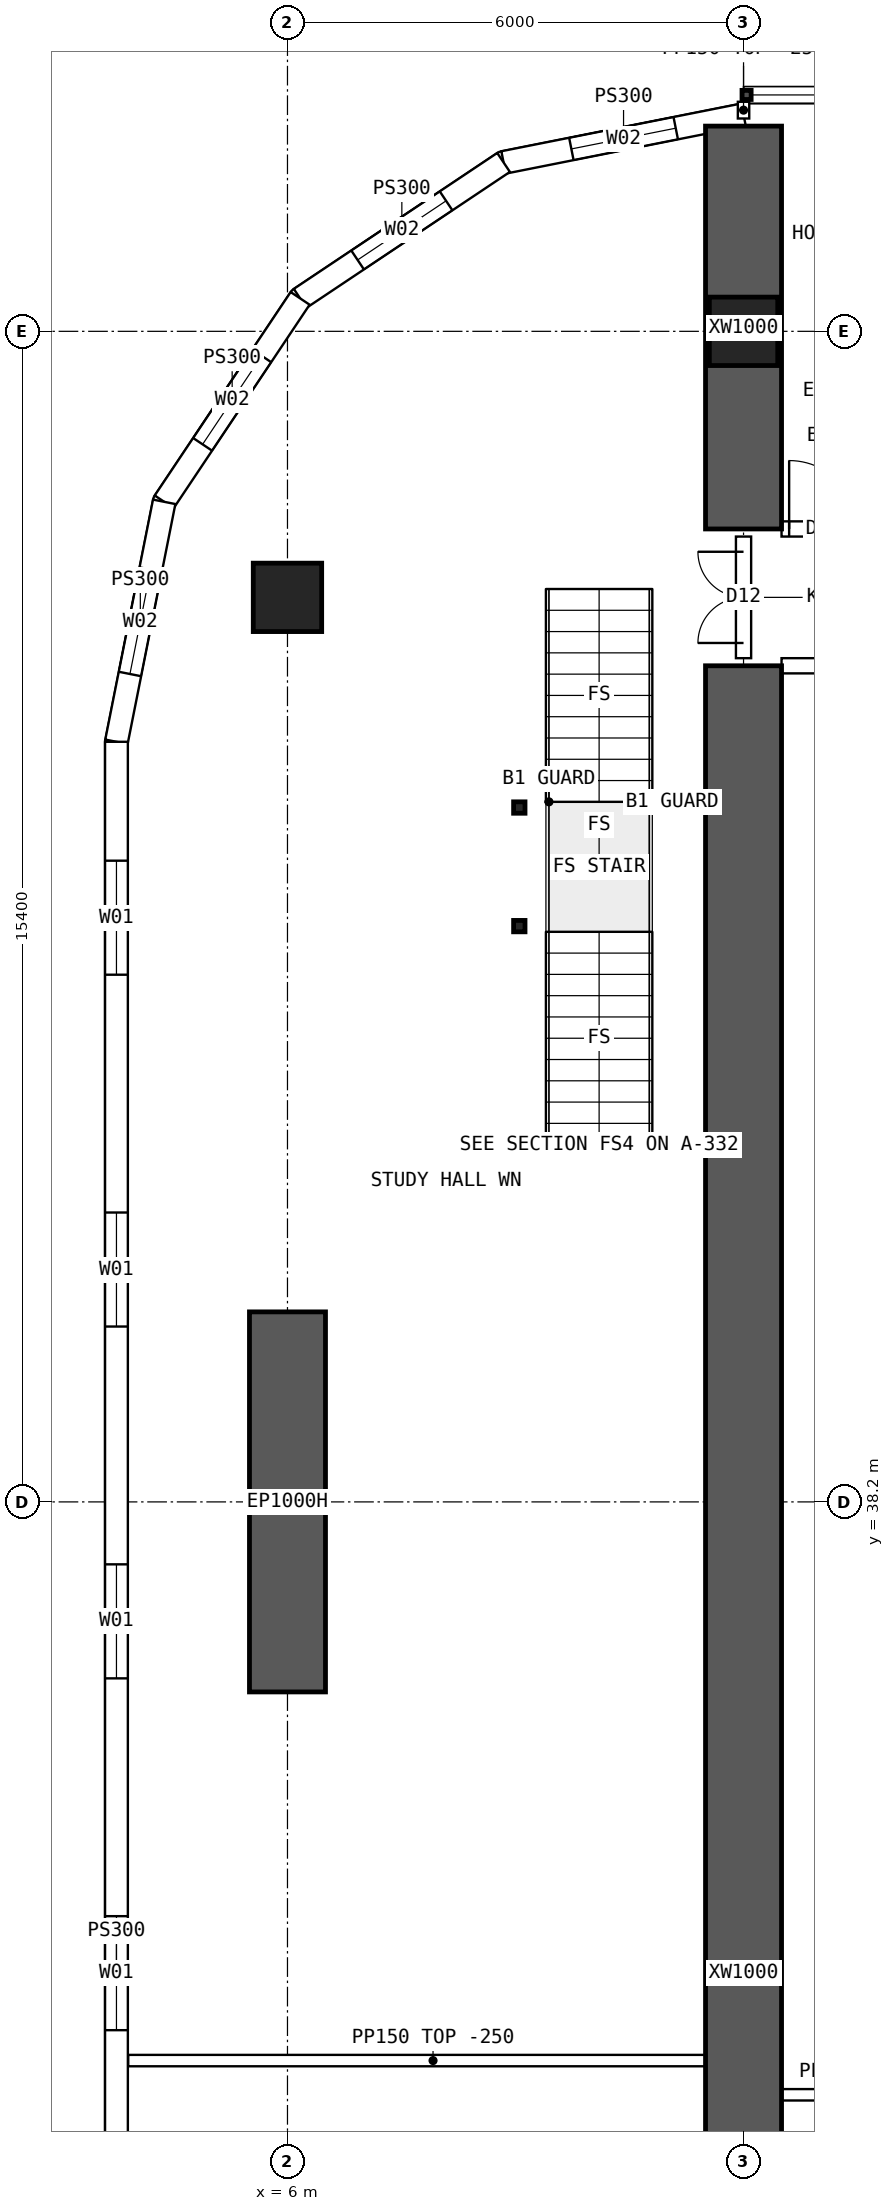
"""IFC4 building model, lengths in metres.
Left out: names, types, materials, properties, quantities, classifications, styles, units other than length and angle.
Written with IfcOpenShell. Run it as: python <this file> out.ifc"""

import sys

from ifc_helpers import new_model, si_unit, direction, frame, frame_2d, origin, origin_2d, place, context, subcontext, project, spatial, polyline, rectangle, hollow_rectangle, outline, extrude, element, fill, save


model = new_model("IFC4")
c1 = context("Model", 3, precision=1e-05, world=origin(), true_north=direction((0.0, 1.0)))
c2 = subcontext(c1, "Body", "Model", "MODEL_VIEW")
j1 = project(units=[si_unit("LENGTHUNIT", "METRE"), si_unit("PLANEANGLEUNIT", "RADIAN")], contexts=[c1])
p1 = place(None, origin())
s1 = spatial("IfcSite", under=j1, at=p1, CompositionType="ELEMENT")
p2 = place(p1, origin())
s2 = spatial("IfcBuilding", under=s1, at=p2, CompositionType="ELEMENT")
p3 = place(p2, frame((0.0, 0.0, 38.95)))
s3 = spatial("IfcBuildingStorey", under=s2, at=p3, CompositionType="ELEMENT", Elevation=38.95)
for number, where, z_axis, x_axis in (
    (1, (12.0, 53.6, 0.0), (0.0, 0.0, 1.0), (1.0, 0.0, 0.0)),
    (2, (6.0, 50.1, 0.0), (0.0, 0.0, 1.0), (1.0, 0.0, 0.0)),
):
    element("IfcColumn", number, at=place(p3, frame(where, z_axis=z_axis, x_axis=x_axis)), inside=s3, PredefinedType="COLUMN", context=c2, shape_type="SweptSolid", body=[
        extrude(hollow_rectangle(XDim=0.9, YDim=0.9, WallThickness=0.09, at=origin_2d()), origin(), (0.0, 0.0, 1.0), 3.75),
    ])
p4 = place(p3, frame((6.0, 35.7, 0.0), z_axis=(0.0, 0.0, 1.0), x_axis=(0.0, 1.0, 0.0)))
e3 = element("IfcWall", 3, at=p4, inside=s3, PredefinedType="SHEAR", context=c2, shape_type="SweptSolid", body=[
    extrude(rectangle(XDim=5.0, YDim=1.0, at=frame_2d((2.5, 0.0))), origin(), (0.0, 0.0, 1.0), 3.75),
])
p5 = place(p3, frame((12.0, 51.0, 0.0), z_axis=(0.0, 0.0, 1.0), x_axis=(0.0, 1.0, 0.0)))
e4 = element("IfcWall", 4, at=p5, inside=s3, PredefinedType="SHEAR", context=c2, shape_type="SweptSolid", body=[
    extrude(rectangle(XDim=5.3, YDim=1.0, at=frame_2d((2.65, 0.0))), origin(), (0.0, 0.0, 1.0), 3.75),
])
p6 = place(p3, frame((12.0, 14.8, 0.0), z_axis=(0.0, 0.0, 1.0), x_axis=(0.0, 1.0, 0.0)))
e5 = element("IfcWall", 5, at=p6, inside=s3, PredefinedType="SHEAR", context=c2, shape_type="SweptSolid", body=[
    extrude(rectangle(XDim=34.4, YDim=1.0, at=frame_2d((17.2, 0.0))), origin(), (0.0, 0.0, 1.0), 3.75),
])
p7 = place(p3, frame((3.75, 48.2, 0.0), z_axis=(0.0, 0.0, 1.0), x_axis=(0.0, -1.0, 0.0)))
e6 = element("IfcWall", 6, at=p7, inside=s3, PredefinedType="SOLIDWALL", context=c2, shape_type="SweptSolid", body=[
    extrude(outline(polyline([(-0.015, -0.15), (32.415, -0.15), (32.385, 0.15), (0.015, 0.15), (-0.015, -0.15)])), origin(), (0.0, 0.0, 1.0), 3.5),
])
p8 = place(p7, frame((1.564, 0.0, 0.9)))
e7 = element("IfcOpeningElement", 7, at=p8, cuts=e6, PredefinedType="OPENING", context=c2, shape_type="SweptSolid", body=[
    extrude(rectangle(XDim=1.5, YDim=2.0, at=frame_2d((0.75, 1.0))), frame((0.0, 0.16, 0.0), z_axis=(0.0, -1.0, 0.0), x_axis=(1.0, 0.0, 0.0)), (0.0, 0.0, 1.0), 0.32),
])
p9 = place(p7, frame((6.193, 0.0, 0.9)))
e8 = element("IfcOpeningElement", 8, at=p9, cuts=e6, PredefinedType="OPENING", context=c2, shape_type="SweptSolid", body=[
    extrude(rectangle(XDim=1.5, YDim=2.0, at=frame_2d((0.75, 1.0))), frame((0.0, 0.16, 0.0), z_axis=(0.0, -1.0, 0.0), x_axis=(1.0, 0.0, 0.0)), (0.0, 0.0, 1.0), 0.32),
])
p10 = place(p7, frame((10.822, 0.0, 0.9)))
e9 = element("IfcOpeningElement", 9, at=p10, cuts=e6, PredefinedType="OPENING", context=c2, shape_type="SweptSolid", body=[
    extrude(rectangle(XDim=1.5, YDim=2.0, at=frame_2d((0.75, 1.0))), frame((0.0, 0.16, 0.0), z_axis=(0.0, -1.0, 0.0), x_axis=(1.0, 0.0, 0.0)), (0.0, 0.0, 1.0), 0.32),
])
p11 = place(p7, frame((15.45, 0.0, 0.9)))
e10 = element("IfcOpeningElement", 10, at=p11, cuts=e6, PredefinedType="OPENING", context=c2, shape_type="SweptSolid", body=[
    extrude(rectangle(XDim=1.5, YDim=2.0, at=frame_2d((0.75, 1.0))), frame((0.0, 0.16, 0.0), z_axis=(0.0, -1.0, 0.0), x_axis=(1.0, 0.0, 0.0)), (0.0, 0.0, 1.0), 0.32),
])
p12 = place(p7, frame((20.079, 0.0, 0.9)))
e11 = element("IfcOpeningElement", 11, at=p12, cuts=e6, PredefinedType="OPENING", context=c2, shape_type="SweptSolid", body=[
    extrude(rectangle(XDim=1.5, YDim=2.0, at=frame_2d((0.75, 1.0))), frame((0.0, 0.16, 0.0), z_axis=(0.0, -1.0, 0.0), x_axis=(1.0, 0.0, 0.0)), (0.0, 0.0, 1.0), 0.32),
])
p13 = place(p7, frame((24.707, 0.0, 0.9)))
e12 = element("IfcOpeningElement", 12, at=p13, cuts=e6, PredefinedType="OPENING", context=c2, shape_type="SweptSolid", body=[
    extrude(rectangle(XDim=1.5, YDim=2.0, at=frame_2d((0.75, 1.0))), frame((0.0, 0.16, 0.0), z_axis=(0.0, -1.0, 0.0), x_axis=(1.0, 0.0, 0.0)), (0.0, 0.0, 1.0), 0.32),
])
p14 = place(p7, frame((29.336, 0.0, 0.9)))
e13 = element("IfcOpeningElement", 13, at=p14, cuts=e6, PredefinedType="OPENING", context=c2, shape_type="SweptSolid", body=[
    extrude(rectangle(XDim=1.5, YDim=2.0, at=frame_2d((0.75, 1.0))), frame((0.0, 0.16, 0.0), z_axis=(0.0, -1.0, 0.0), x_axis=(1.0, 0.0, 0.0)), (0.0, 0.0, 1.0), 0.32),
])
p15 = place(p3, frame((12.0, 56.45, 0.0), z_axis=(0.0, 0.0, 1.0), x_axis=(-0.980787251524, -0.195080412259, 0.0)))
e14 = element("IfcWall", 14, at=p15, inside=s3, PredefinedType="SOLIDWALL", context=c2, shape_type="SweptSolid", body=[
    extrude(outline(polyline([(-0.03, -0.15), (3.249, -0.15), (3.189, 0.15), (0.03, 0.15), (-0.03, -0.15)])), origin(), (0.0, 0.0, 1.0), 3.5),
])
p16 = place(p15, frame((0.909, 0.0, 0.9)))
e15 = element("IfcOpeningElement", 15, at=p16, cuts=e14, PredefinedType="OPENING", context=c2, shape_type="SweptSolid", body=[
    extrude(rectangle(XDim=1.4, YDim=1.8, at=frame_2d((0.7, 0.9))), frame((0.0, 0.16, 0.0), z_axis=(0.0, -1.0, 0.0), x_axis=(1.0, 0.0, 0.0)), (0.0, 0.0, 1.0), 0.32),
])
p17 = place(p3, frame((8.843, 55.822, 0.0), z_axis=(0.0, 0.0, 1.0), x_axis=(-0.831478105043, -0.555557522525, 0.0)))
e16 = element("IfcWall", 16, at=p17, inside=s3, PredefinedType="SOLIDWALL", context=c2, shape_type="SweptSolid", body=[
    extrude(outline(polyline([(-0.03, -0.15), (3.249, -0.15), (3.189, 0.15), (0.03, 0.15), (-0.03, -0.15)])), origin(), (0.0, 0.0, 1.0), 3.5),
])
p18 = place(p17, frame((0.909, 0.0, 0.9)))
e17 = element("IfcOpeningElement", 17, at=p18, cuts=e16, PredefinedType="OPENING", context=c2, shape_type="SweptSolid", body=[
    extrude(rectangle(XDim=1.4, YDim=1.8, at=frame_2d((0.7, 0.9))), frame((0.0, 0.16, 0.0), z_axis=(0.0, -1.0, 0.0), x_axis=(1.0, 0.0, 0.0)), (0.0, 0.0, 1.0), 0.32),
])
p19 = place(p3, frame((6.167, 54.034, 0.0), z_axis=(0.0, 0.0, 1.0), x_axis=(-0.555609954424, -0.831443069936, 0.0)))
e18 = element("IfcWall", 18, at=p19, inside=s3, PredefinedType="SOLIDWALL", context=c2, shape_type="SweptSolid", body=[
    extrude(outline(polyline([(-0.03, -0.15), (3.249, -0.15), (3.189, 0.15), (0.03, 0.15), (-0.03, -0.15)])), origin(), (0.0, 0.0, 1.0), 3.5),
])
p20 = place(p19, frame((0.909, 0.0, 0.9)))
e19 = element("IfcOpeningElement", 19, at=p20, cuts=e18, PredefinedType="OPENING", context=c2, shape_type="SweptSolid", body=[
    extrude(rectangle(XDim=1.4, YDim=1.8, at=frame_2d((0.7, 0.9))), frame((0.0, 0.16, 0.0), z_axis=(0.0, -1.0, 0.0), x_axis=(1.0, 0.0, 0.0)), (0.0, 0.0, 1.0), 0.32),
])
p21 = place(p3, frame((4.378, 51.357, 0.0), z_axis=(0.0, 0.0, 1.0), x_axis=(-0.195065901187, -0.980790137692, 0.0)))
e20 = element("IfcWall", 20, at=p21, inside=s3, PredefinedType="SOLIDWALL", context=c2, shape_type="SweptSolid", body=[
    extrude(outline(polyline([(-0.03, -0.15), (3.234, -0.15), (3.204, 0.15), (0.03, 0.15), (-0.03, -0.15)])), origin(), (0.0, 0.0, 1.0), 3.5),
])
p22 = place(p21, frame((0.909, 0.0, 0.9)))
e21 = element("IfcOpeningElement", 21, at=p22, cuts=e20, PredefinedType="OPENING", context=c2, shape_type="SweptSolid", body=[
    extrude(rectangle(XDim=1.4, YDim=1.8, at=frame_2d((0.7, 0.9))), frame((0.0, 0.16, 0.0), z_axis=(0.0, -1.0, 0.0), x_axis=(1.0, 0.0, 0.0)), (0.0, 0.0, 1.0), 0.32),
])
p23 = place(p3, frame((12.5, 51.0, 0.0), z_axis=(0.0, 0.0, 1.0), x_axis=(1.0, 0.0, 0.0)))
e22 = element("IfcWall", 22, at=p23, inside=s3, PredefinedType="SOLIDWALL", context=c2, shape_type="SweptSolid", body=[
    extrude(outline(polyline([(0.0, 0.0), (5.0, 0.0), (5.0, 3.1), (0.0, 3.1), (0.0, 0.0)])), frame((0.0, 0.1, 0.0), z_axis=(0.0, -1.0, 0.0), x_axis=(1.0, 0.0, 0.0)), (0.0, 0.0, 1.0), 0.2),
])
p24 = place(p23, frame((0.1, 0.0, 0.0)))
e23 = element("IfcOpeningElement", 23, at=p24, cuts=e22, PredefinedType="OPENING", context=c2, shape_type="SweptSolid", body=[
    extrude(rectangle(XDim=0.9, YDim=2.1, at=frame_2d((0.45, 1.05))), frame((0.0, 0.11, 0.0), z_axis=(0.0, -1.0, 0.0), x_axis=(1.0, 0.0, 0.0)), (0.0, 0.0, 1.0), 0.22),
])
p25 = place(p23, frame((4.0, 0.0, 0.0)))
e24 = element("IfcOpeningElement", 24, at=p25, cuts=e22, PredefinedType="OPENING", context=c2, shape_type="SweptSolid", body=[
    extrude(rectangle(XDim=0.9, YDim=2.1, at=frame_2d((0.45, 1.05))), frame((0.0, 0.11, 0.0), z_axis=(0.0, -1.0, 0.0), x_axis=(1.0, 0.0, 0.0)), (0.0, 0.0, 1.0), 0.22),
])
p26 = place(p3, frame((12.5, 49.2, 0.0), z_axis=(0.0, 0.0, 1.0), x_axis=(1.0, 0.0, 0.0)))
e25 = element("IfcWall", 25, at=p26, inside=s3, PredefinedType="SOLIDWALL", context=c2, shape_type="SweptSolid", body=[
    extrude(rectangle(XDim=5.0, YDim=0.2, at=frame_2d((2.5, 0.0))), origin(), (0.0, 0.0, 1.0), 3.5),
])
p27 = place(p26, frame((3.3, 0.0, 0.0)))
e26 = element("IfcOpeningElement", 26, at=p27, cuts=e25, PredefinedType="OPENING", context=c2, shape_type="SweptSolid", body=[
    extrude(rectangle(XDim=1.6, YDim=2.1, at=frame_2d((0.8, 1.05))), frame((0.0, 0.11, 0.0), z_axis=(0.0, -1.0, 0.0), x_axis=(1.0, 0.0, 0.0)), (0.0, 0.0, 1.0), 0.22),
])
p28 = place(p3, frame((12.0, 30.4, 0.0), z_axis=(0.0, 0.0, 1.0), x_axis=(1.0, 0.0, 0.0)))
e27 = element("IfcWall", 27, at=p28, inside=s3, PredefinedType="PARTITIONING", context=c2, shape_type="SweptSolid", body=[
    extrude(rectangle(XDim=3.6, YDim=0.15, at=frame_2d((1.8, 0.0))), origin(), (0.0, 0.0, 1.0), 3.5),
])
p29 = place(p3, frame((3.905, 30.85, 0.0), z_axis=(0.0, 0.0, 1.0), x_axis=(1.0, 0.0, 0.0)))
e28 = element("IfcWall", 28, at=p29, inside=s3, PredefinedType="PARTITIONING", context=c2, shape_type="SweptSolid", body=[
    extrude(outline(polyline([(0.0, 0.0), (8.02, 0.0), (8.02, 3.5), (2.397, 3.5), (2.395, 3.05), (1.797, 3.05), (1.795, 3.5), (0.0, 3.5), (0.0, 0.0)])), frame((0.0, 0.075, 0.0), z_axis=(0.0, -1.0, 0.0), x_axis=(1.0, 0.0, 0.0)), (0.0, 0.0, 1.0), 0.15),
])
p30 = place(p3, frame((12.0, 49.3, 0.0), z_axis=(0.0, 0.0, 1.0), x_axis=(0.0, 1.0, 0.0)))
e29 = element("IfcWall", 29, at=p30, inside=s3, PredefinedType="SOLIDWALL", context=c2, shape_type="SweptSolid", body=[
    extrude(outline(polyline([(0.0, 0.0), (1.6, 0.0), (1.6, 3.05), (0.0, 3.05), (0.0, 0.0)])), frame((0.0, 0.1, 0.0), z_axis=(0.0, -1.0, 0.0), x_axis=(1.0, 0.0, 0.0)), (0.0, 0.0, 1.0), 0.2),
])
p31 = place(p30, frame((0.2, 0.0, 0.0)))
e30 = element("IfcOpeningElement", 30, at=p31, cuts=e29, PredefinedType="OPENING", context=c2, shape_type="SweptSolid", body=[
    extrude(rectangle(XDim=1.2, YDim=2.1, at=frame_2d((0.6, 1.05))), frame((0.0, 0.11, 0.0), z_axis=(0.0, -1.0, 0.0), x_axis=(1.0, 0.0, 0.0)), (0.0, 0.0, 1.0), 0.22),
])
p32 = place(p3, frame((12.0, 56.4, 0.0), z_axis=(0.0, 0.0, 1.0), x_axis=(0.0, 1.0, 0.0)))
e31 = element("IfcWall", 31, at=p32, inside=s3, PredefinedType="PARTITIONING", context=c2, shape_type="SweptSolid", body=[
    extrude(rectangle(XDim=0.22, YDim=0.15, at=frame_2d((0.11, 0.0))), origin(), (0.0, 0.0, 1.0), 3.5),
])
for number, where, z_axis, x_axis in (
    (32, (9.05, 45.775, 0.0), (0.0, 0.0, 1.0), (1.0, 0.0, 0.0)),
    (33, (9.05, 47.335, 0.0), (0.0, 0.0, 1.0), (1.0, 0.0, 0.0)),
):
    element("IfcColumn", number, at=place(p3, frame(where, z_axis=z_axis, x_axis=x_axis)), inside=s3, PredefinedType="COLUMN", context=c2, shape_type="SweptSolid", body=[
        extrude(hollow_rectangle(XDim=0.15, YDim=0.15, WallThickness=0.008, at=origin_2d()), origin(), (0.0, 0.0, 1.0), 3.5),
    ])
p33 = place(p8, origin())
e34 = element("IfcWindow", 34, at=p33, inside=s3, PartitioningType="SINGLE_PANEL", PredefinedType="WINDOW", context=c2, shape_type="SweptSolid", body=[
    extrude(rectangle(XDim=1.5, YDim=2.0, at=frame_2d((0.75, 1.0))), frame((0.0, 0.03, 0.0), z_axis=(0.0, -1.0, 0.0), x_axis=(1.0, 0.0, 0.0)), (0.0, 0.0, 1.0), 0.06),
])
fill(e7, e34)
p34 = place(p9, origin())
e35 = element("IfcWindow", 35, at=p34, inside=s3, PartitioningType="SINGLE_PANEL", PredefinedType="WINDOW", context=c2, shape_type="SweptSolid", body=[
    extrude(rectangle(XDim=1.5, YDim=2.0, at=frame_2d((0.75, 1.0))), frame((0.0, 0.03, 0.0), z_axis=(0.0, -1.0, 0.0), x_axis=(1.0, 0.0, 0.0)), (0.0, 0.0, 1.0), 0.06),
])
fill(e8, e35)
p35 = place(p10, origin())
e36 = element("IfcWindow", 36, at=p35, inside=s3, PartitioningType="SINGLE_PANEL", PredefinedType="WINDOW", context=c2, shape_type="SweptSolid", body=[
    extrude(rectangle(XDim=1.5, YDim=2.0, at=frame_2d((0.75, 1.0))), frame((0.0, 0.03, 0.0), z_axis=(0.0, -1.0, 0.0), x_axis=(1.0, 0.0, 0.0)), (0.0, 0.0, 1.0), 0.06),
])
fill(e9, e36)
p36 = place(p11, origin())
e37 = element("IfcWindow", 37, at=p36, inside=s3, PartitioningType="SINGLE_PANEL", PredefinedType="WINDOW", context=c2, shape_type="SweptSolid", body=[
    extrude(rectangle(XDim=1.5, YDim=2.0, at=frame_2d((0.75, 1.0))), frame((0.0, 0.03, 0.0), z_axis=(0.0, -1.0, 0.0), x_axis=(1.0, 0.0, 0.0)), (0.0, 0.0, 1.0), 0.06),
])
fill(e10, e37)
p37 = place(p16, origin())
e38 = element("IfcWindow", 38, at=p37, inside=s3, PartitioningType="SINGLE_PANEL", PredefinedType="WINDOW", context=c2, shape_type="SweptSolid", body=[
    extrude(rectangle(XDim=1.4, YDim=1.8, at=frame_2d((0.7, 0.9))), frame((0.0, 0.03, 0.0), z_axis=(0.0, -1.0, 0.0), x_axis=(1.0, 0.0, 0.0)), (0.0, 0.0, 1.0), 0.06),
])
fill(e15, e38)
p38 = place(p18, origin())
e39 = element("IfcWindow", 39, at=p38, inside=s3, PartitioningType="SINGLE_PANEL", PredefinedType="WINDOW", context=c2, shape_type="SweptSolid", body=[
    extrude(rectangle(XDim=1.4, YDim=1.8, at=frame_2d((0.7, 0.9))), frame((0.0, 0.03, 0.0), z_axis=(0.0, -1.0, 0.0), x_axis=(1.0, 0.0, 0.0)), (0.0, 0.0, 1.0), 0.06),
])
fill(e17, e39)
p39 = place(p20, origin())
e40 = element("IfcWindow", 40, at=p39, inside=s3, PartitioningType="SINGLE_PANEL", PredefinedType="WINDOW", context=c2, shape_type="SweptSolid", body=[
    extrude(rectangle(XDim=1.4, YDim=1.8, at=frame_2d((0.7, 0.9))), frame((0.0, 0.03, 0.0), z_axis=(0.0, -1.0, 0.0), x_axis=(1.0, 0.0, 0.0)), (0.0, 0.0, 1.0), 0.06),
])
fill(e19, e40)
p40 = place(p22, origin())
e41 = element("IfcWindow", 41, at=p40, inside=s3, PartitioningType="SINGLE_PANEL", PredefinedType="WINDOW", context=c2, shape_type="SweptSolid", body=[
    extrude(rectangle(XDim=1.4, YDim=1.8, at=frame_2d((0.7, 0.9))), frame((0.0, 0.03, 0.0), z_axis=(0.0, -1.0, 0.0), x_axis=(1.0, 0.0, 0.0)), (0.0, 0.0, 1.0), 0.06),
])
fill(e21, e41)
p41 = place(p24, origin())
e42 = element("IfcDoor", 42, at=p41, inside=s3, OperationType="SINGLE_SWING_LEFT", PredefinedType="DOOR", context=c2, shape_type="SweptSolid", body=[
    extrude(rectangle(XDim=0.9, YDim=2.1, at=frame_2d((0.45, 1.05))), frame((0.0, 0.025, 0.0), z_axis=(0.0, -1.0, 0.0), x_axis=(1.0, 0.0, 0.0)), (0.0, 0.0, 1.0), 0.05),
])
fill(e23, e42)
p42 = place(p31, origin())
e43 = element("IfcDoor", 43, at=p42, inside=s3, OperationType="DOUBLE_DOOR_SINGLE_SWING", PredefinedType="DOOR", context=c2, shape_type="SweptSolid", body=[
    extrude(rectangle(XDim=1.2, YDim=2.1, at=frame_2d((0.6, 1.05))), frame((0.0, 0.025, 0.0), z_axis=(0.0, -1.0, 0.0), x_axis=(1.0, 0.0, 0.0)), (0.0, 0.0, 1.0), 0.05),
])
fill(e30, e43)
save(model, sys.argv[1])
